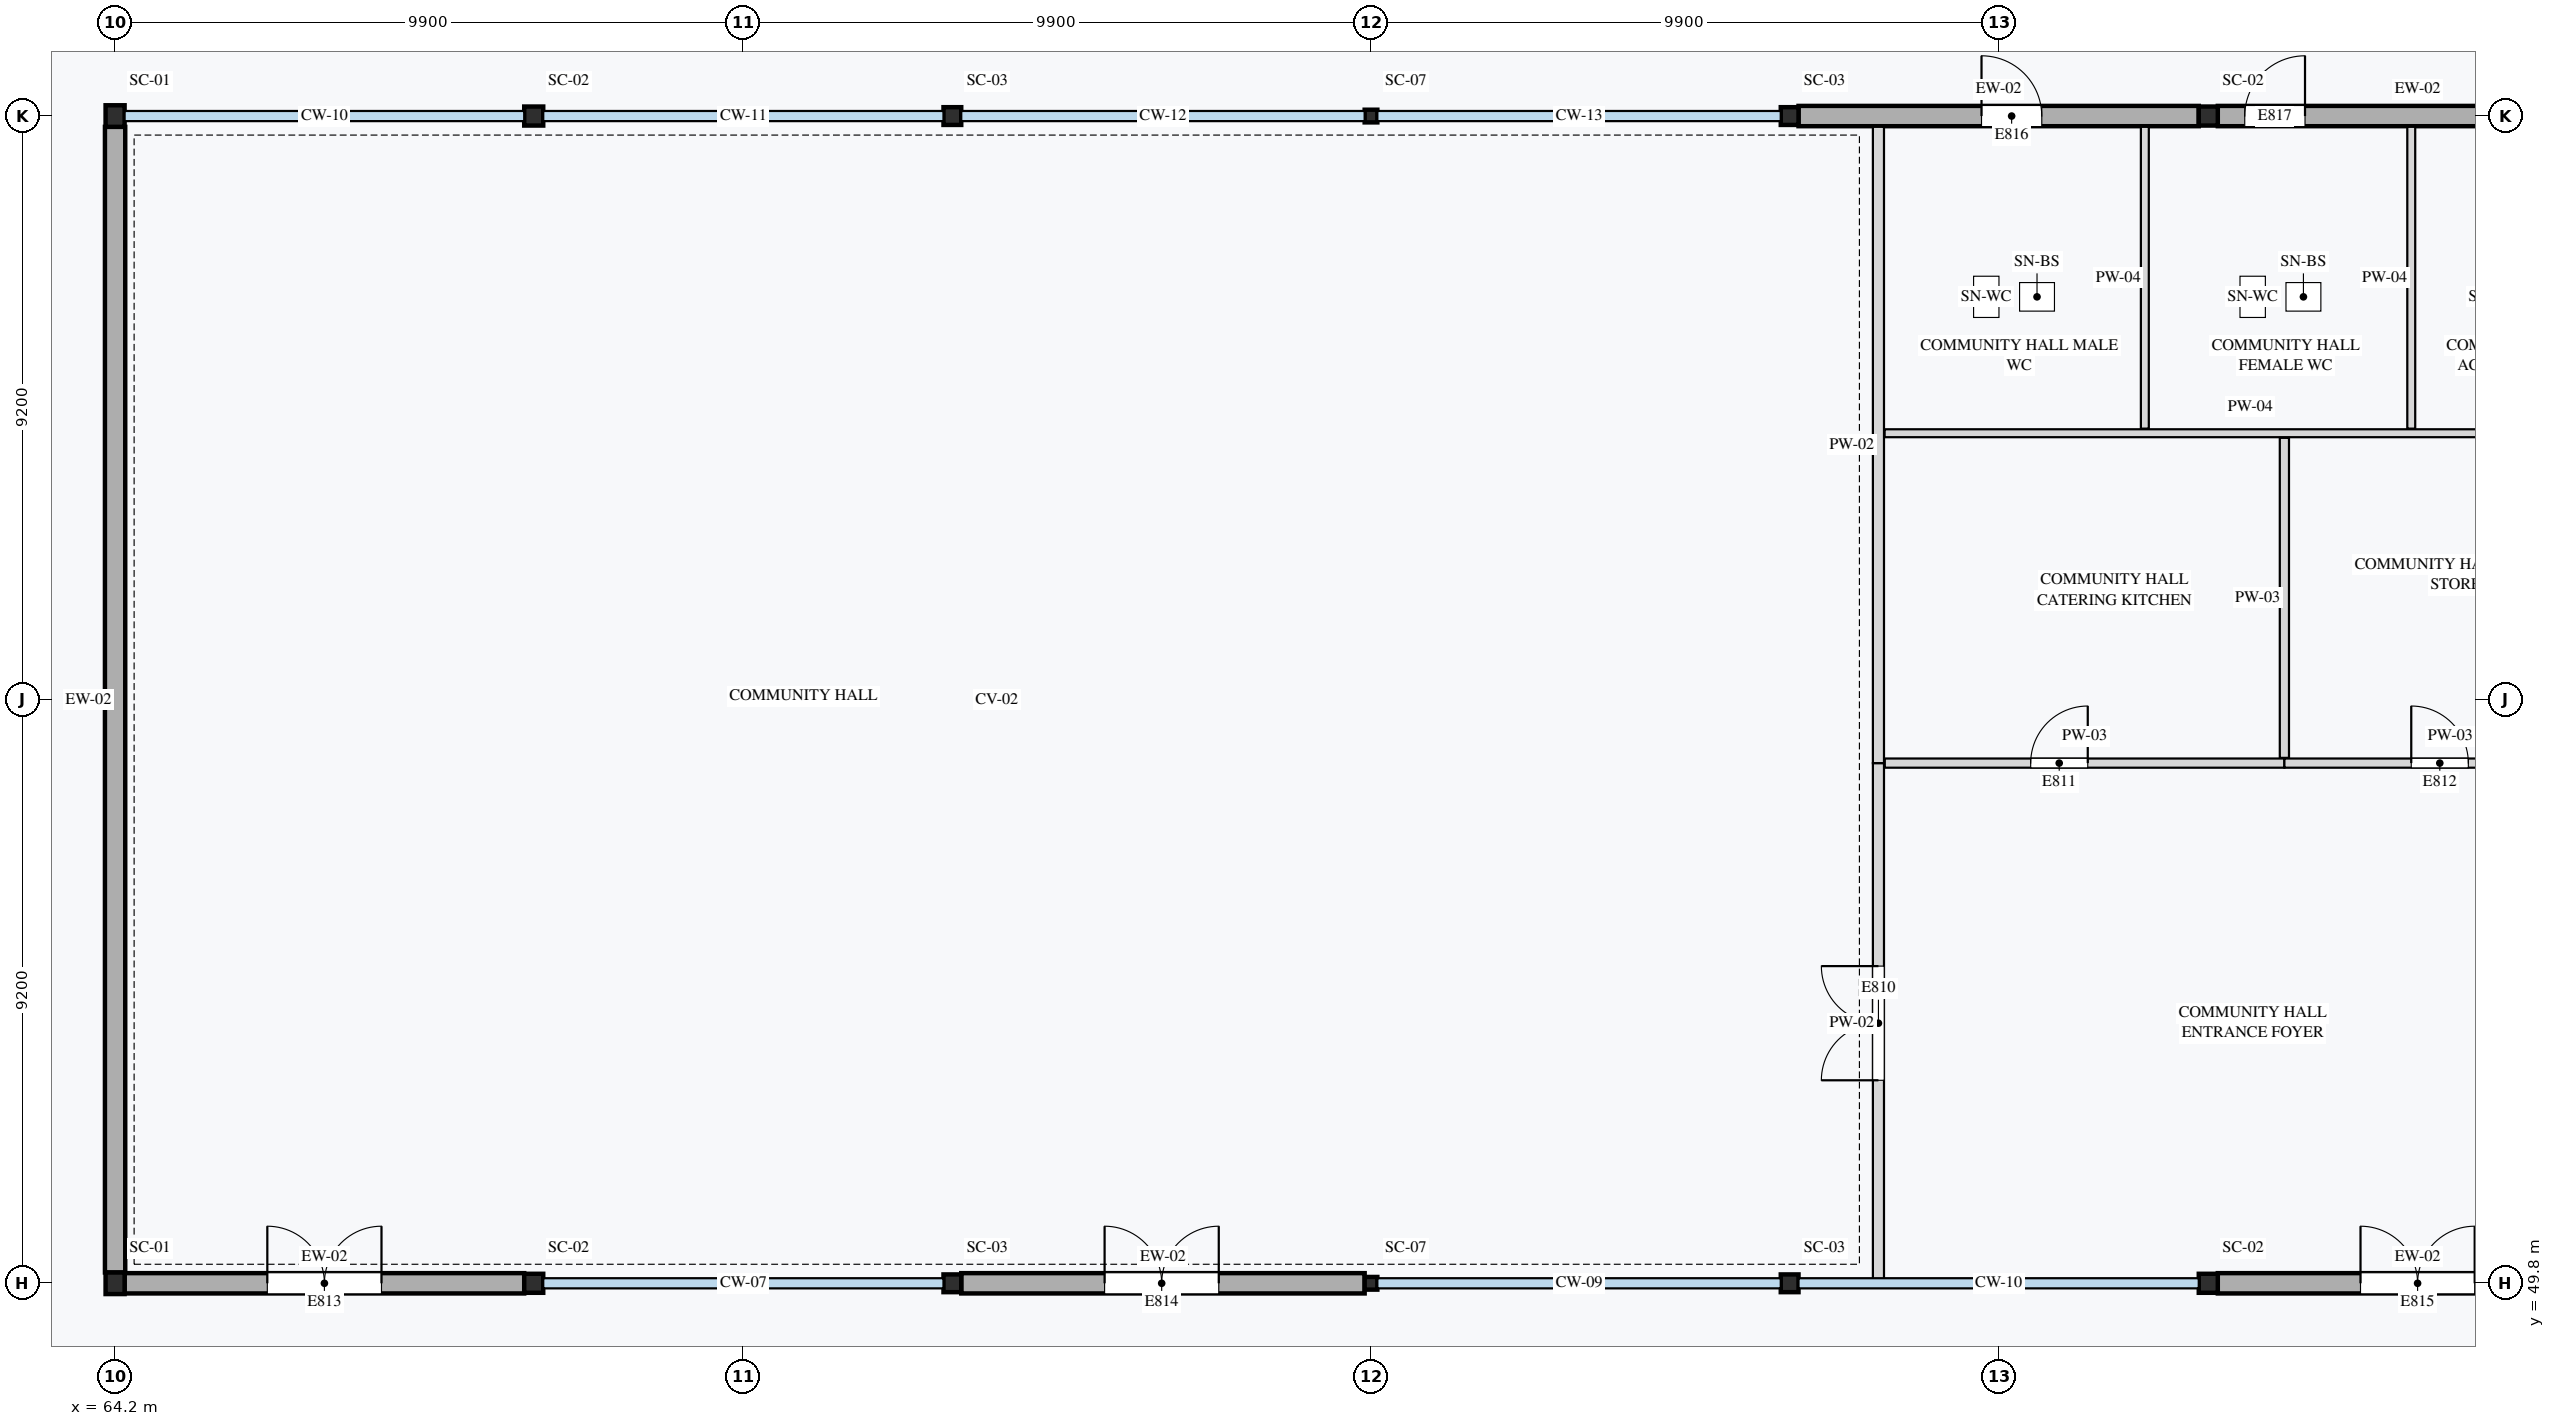
"""IFC4 building model, lengths in metres.
Left out: names, types, materials, properties, quantities, classifications, styles, units other than length and angle.
Written with IfcOpenShell. Run it as: python <this file> out.ifc"""

import sys

from ifc_helpers import new_model, si_unit, direction, frame, frame_2d, origin, origin_2d, place, context, subcontext, project, spatial, rectangle, hollow_rectangle, i_section, extrude, element, fill, save


model = new_model("IFC4")
c1 = context("Model", 3, precision=1e-05, world=origin(), true_north=direction((0.0, 1.0)))
c2 = subcontext(c1, "Body", "Model", "MODEL_VIEW")
j1 = project(units=[si_unit("LENGTHUNIT", "METRE"), si_unit("PLANEANGLEUNIT", "RADIAN")], contexts=[c1])
p1 = place(None, origin())
s1 = spatial("IfcSite", under=j1, at=p1, CompositionType="ELEMENT")
p2 = place(p1, origin())
s2 = spatial("IfcBuilding", under=s1, at=p2, CompositionType="ELEMENT")
p3 = place(p2, frame((0.0, 0.0, 4.2)))
s3 = spatial("IfcBuildingStorey", under=s2, at=p3, CompositionType="ELEMENT", Elevation=4.2)
for number, where, z_axis, x_axis in (
    (1, (64.2, 49.8, 0.0), (0.0, 0.0, 1.0), (1.0, 0.0, 0.0)),
    (2, (64.2, 68.2, 0.0), (0.0, 0.0, 1.0), (1.0, 0.0, 0.0)),
):
    element("IfcColumn", number, at=place(p3, frame(where, z_axis=z_axis, x_axis=x_axis)), inside=s3, PredefinedType="COLUMN", context=c2, shape_type="SweptSolid", body=[
        extrude(i_section(OverallWidth=0.3, OverallDepth=0.34, WebThickness=0.012, FlangeThickness=0.021, FilletRadius=0.027, at=origin_2d()), origin(), (0.0, 0.0, 1.0), 3.96),
    ])
for number, where, z_axis, x_axis in (
    (3, (70.8, 49.8, 0.0), (0.0, 0.0, 1.0), (1.0, 0.0, 0.0)),
    (4, (70.8, 68.2, 0.0), (0.0, 0.0, 1.0), (1.0, 0.0, 0.0)),
):
    element("IfcColumn", number, at=place(p3, frame(where, z_axis=z_axis, x_axis=x_axis)), inside=s3, PredefinedType="COLUMN", context=c2, shape_type="SweptSolid", body=[
        extrude(i_section(OverallWidth=0.3, OverallDepth=0.3, WebThickness=0.011, FlangeThickness=0.019, FilletRadius=0.027, at=origin_2d()), origin(), (0.0, 0.0, 1.0), 3.96),
    ])
for number, where, z_axis, x_axis in (
    (5, (77.4, 49.8, 0.0), (0.0, 0.0, 1.0), (1.0, 0.0, 0.0)),
    (6, (77.4, 68.2, 0.0), (0.0, 0.0, 1.0), (1.0, 0.0, 0.0)),
):
    element("IfcColumn", number, at=place(p3, frame(where, z_axis=z_axis, x_axis=x_axis)), inside=s3, PredefinedType="COLUMN", context=c2, shape_type="SweptSolid", body=[
        extrude(i_section(OverallWidth=0.28, OverallDepth=0.28, WebThickness=0.01, FlangeThickness=0.018, FilletRadius=0.024, at=origin_2d()), origin(), (0.0, 0.0, 1.0), 3.96),
    ])
for number, where, z_axis, x_axis in (
    (7, (84.0, 49.8, 0.0), (0.0, 0.0, 1.0), (1.0, 0.0, 0.0)),
    (8, (84.0, 68.2, 0.0), (0.0, 0.0, 1.0), (1.0, 0.0, 0.0)),
):
    element("IfcColumn", number, at=place(p3, frame(where, z_axis=z_axis, x_axis=x_axis)), inside=s3, PredefinedType="COLUMN", context=c2, shape_type="SweptSolid", body=[
        extrude(hollow_rectangle(XDim=0.2, YDim=0.2, WallThickness=0.01, InnerFilletRadius=0.01, OuterFilletRadius=0.015, at=origin_2d()), origin(), (0.0, 0.0, 1.0), 3.96),
    ])
for number, where, z_axis, x_axis in (
    (9, (90.6, 49.8, 0.0), (0.0, 0.0, 1.0), (1.0, 0.0, 0.0)),
    (10, (90.6, 68.2, 0.0), (0.0, 0.0, 1.0), (1.0, 0.0, 0.0)),
):
    element("IfcColumn", number, at=place(p3, frame(where, z_axis=z_axis, x_axis=x_axis)), inside=s3, PredefinedType="COLUMN", context=c2, shape_type="SweptSolid", body=[
        extrude(i_section(OverallWidth=0.28, OverallDepth=0.28, WebThickness=0.01, FlangeThickness=0.018, FilletRadius=0.024, at=origin_2d()), origin(), (0.0, 0.0, 1.0), 3.96),
    ])
for number, where, z_axis, x_axis in (
    (11, (97.2, 49.8, 0.0), (0.0, 0.0, 1.0), (1.0, 0.0, 0.0)),
    (12, (97.2, 68.2, 0.0), (0.0, 0.0, 1.0), (1.0, 0.0, 0.0)),
):
    element("IfcColumn", number, at=place(p3, frame(where, z_axis=z_axis, x_axis=x_axis)), inside=s3, PredefinedType="COLUMN", context=c2, shape_type="SweptSolid", body=[
        extrude(i_section(OverallWidth=0.3, OverallDepth=0.3, WebThickness=0.011, FlangeThickness=0.019, FilletRadius=0.027, at=origin_2d()), origin(), (0.0, 0.0, 1.0), 3.96),
    ])
p4 = place(p3, frame((64.35, 49.8, 0.0), z_axis=(0.0, 0.0, 1.0), x_axis=(1.0, 0.0, 0.0)))
e13 = element("IfcWall", 13, at=p4, inside=s3, PredefinedType="STANDARD", context=c2, shape_type="SweptSolid", body=[
    extrude(rectangle(XDim=6.3, YDim=0.32, at=frame_2d((3.15, 0.0))), origin(), (0.0, 0.0, 1.0), 3.55),
])
p5 = place(p4, frame((2.25, 0.0, 0.0)))
e14 = element("IfcOpeningElement", 14, at=p5, cuts=e13, PredefinedType="OPENING", context=c2, shape_type="SweptSolid", body=[
    extrude(rectangle(XDim=1.8, YDim=2.4, at=frame_2d((0.9, 1.2))), frame((0.0, 0.17, 0.0), z_axis=(0.0, -1.0, 0.0), x_axis=(1.0, 0.0, 0.0)), (0.0, 0.0, 1.0), 0.34),
])
p6 = place(p3, frame((77.54, 49.8, 0.0), z_axis=(0.0, 0.0, 1.0), x_axis=(1.0, 0.0, 0.0)))
e15 = element("IfcWall", 15, at=p6, inside=s3, PredefinedType="STANDARD", context=c2, shape_type="SweptSolid", body=[
    extrude(rectangle(XDim=6.36, YDim=0.32, at=frame_2d((3.18, 0.0))), origin(), (0.0, 0.0, 1.0), 3.55),
])
p7 = place(p6, frame((2.26, 0.0, 0.0)))
e16 = element("IfcOpeningElement", 16, at=p7, cuts=e15, PredefinedType="OPENING", context=c2, shape_type="SweptSolid", body=[
    extrude(rectangle(XDim=1.8, YDim=2.4, at=frame_2d((0.9, 1.2))), frame((0.0, 0.17, 0.0), z_axis=(0.0, -1.0, 0.0), x_axis=(1.0, 0.0, 0.0)), (0.0, 0.0, 1.0), 0.34),
])
p8 = place(p3, frame((90.74, 68.2, 0.0), z_axis=(0.0, 0.0, 1.0), x_axis=(1.0, 0.0, 0.0)))
e17 = element("IfcWall", 17, at=p8, inside=s3, PredefinedType="STANDARD", context=c2, shape_type="SweptSolid", body=[
    extrude(rectangle(XDim=6.31, YDim=0.32, at=frame_2d((3.155, 0.0))), origin(), (0.0, 0.0, 1.0), 3.55),
])
p9 = place(p8, frame((2.885, 0.0, 0.0)))
e18 = element("IfcOpeningElement", 18, at=p9, cuts=e17, PredefinedType="OPENING", context=c2, shape_type="SweptSolid", body=[
    extrude(rectangle(XDim=0.95, YDim=2.3, at=frame_2d((0.475, 1.15))), frame((0.0, 0.17, 0.0), z_axis=(0.0, -1.0, 0.0), x_axis=(1.0, 0.0, 0.0)), (0.0, 0.0, 1.0), 0.34),
])
p10 = place(p3, frame((97.35, 49.8, 0.0), z_axis=(0.0, 0.0, 1.0), x_axis=(1.0, 0.0, 0.0)))
e19 = element("IfcWall", 19, at=p10, inside=s3, PredefinedType="STANDARD", context=c2, shape_type="SweptSolid", body=[
    extrude(rectangle(XDim=6.3, YDim=0.32, at=frame_2d((3.15, 0.0))), origin(), (0.0, 0.0, 1.0), 3.55),
])
p11 = place(p10, frame((2.25, 0.0, 0.0)))
e20 = element("IfcOpeningElement", 20, at=p11, cuts=e19, PredefinedType="OPENING", context=c2, shape_type="SweptSolid", body=[
    extrude(rectangle(XDim=1.8, YDim=2.4, at=frame_2d((0.9, 1.2))), frame((0.0, 0.17, 0.0), z_axis=(0.0, -1.0, 0.0), x_axis=(1.0, 0.0, 0.0)), (0.0, 0.0, 1.0), 0.34),
])
p12 = place(p3, frame((97.35, 68.2, 0.0), z_axis=(0.0, 0.0, 1.0), x_axis=(1.0, 0.0, 0.0)))
e21 = element("IfcWall", 21, at=p12, inside=s3, PredefinedType="STANDARD", context=c2, shape_type="SweptSolid", body=[
    extrude(rectangle(XDim=6.3, YDim=0.32, at=frame_2d((3.15, 0.0))), origin(), (0.0, 0.0, 1.0), 3.55),
])
p13 = place(p12, frame((0.425, 0.0, 0.0)))
e22 = element("IfcOpeningElement", 22, at=p13, cuts=e21, PredefinedType="OPENING", context=c2, shape_type="SweptSolid", body=[
    extrude(rectangle(XDim=0.95, YDim=2.3, at=frame_2d((0.475, 1.15))), frame((0.0, 0.17, 0.0), z_axis=(0.0, -1.0, 0.0), x_axis=(1.0, 0.0, 0.0)), (0.0, 0.0, 1.0), 0.34),
])
p14 = place(p12, frame((4.225, 0.0, 0.0)))
e23 = element("IfcOpeningElement", 23, at=p14, cuts=e21, PredefinedType="OPENING", context=c2, shape_type="SweptSolid", body=[
    extrude(rectangle(XDim=0.95, YDim=2.3, at=frame_2d((0.475, 1.15))), frame((0.0, 0.17, 0.0), z_axis=(0.0, -1.0, 0.0), x_axis=(1.0, 0.0, 0.0)), (0.0, 0.0, 1.0), 0.34),
])
p15 = place(p3, frame((64.2, 49.97, 0.0), z_axis=(0.0, 0.0, 1.0), x_axis=(0.0, 1.0, 0.0)))
e24 = element("IfcWall", 24, at=p15, inside=s3, PredefinedType="STANDARD", context=c2, shape_type="SweptSolid", body=[
    extrude(rectangle(XDim=18.06, YDim=0.32, at=frame_2d((9.03, 0.0))), origin(), (0.0, 0.0, 1.0), 2.6),
])
p16 = place(p3, frame((92.0, 49.8, 0.0), z_axis=(0.0, 0.0, 1.0), x_axis=(0.0, 1.0, 0.0)))
e25 = element("IfcWall", 25, at=p16, inside=s3, PredefinedType="PARTITIONING", context=c2, shape_type="SweptSolid", body=[
    extrude(rectangle(XDim=8.2, YDim=0.175, at=frame_2d((4.1, 0.0))), origin(), (0.0, 0.0, 1.0), 2.6),
])
p17 = place(p16, frame((3.2, 0.0, 0.0)))
e26 = element("IfcOpeningElement", 26, at=p17, cuts=e25, PredefinedType="OPENING", context=c2, shape_type="SweptSolid", body=[
    extrude(rectangle(XDim=1.8, YDim=2.26, at=frame_2d((0.9, 1.13))), frame((0.0, 0.097, 0.0), z_axis=(0.0, -1.0, 0.0), x_axis=(1.0, 0.0, 0.0)), (0.0, 0.0, 1.0), 0.195),
])
p18 = place(p3, frame((92.0, 58.0, 0.0), z_axis=(0.0, 0.0, 1.0), x_axis=(0.0, 1.0, 0.0)))
e27 = element("IfcWall", 27, at=p18, inside=s3, PredefinedType="PARTITIONING", context=c2, shape_type="SweptSolid", body=[
    extrude(rectangle(XDim=10.03, YDim=0.175, at=frame_2d((5.015, 0.0))), origin(), (0.0, 0.0, 1.0), 2.6),
])
p19 = place(p3, frame((92.1, 58.0, 0.0), z_axis=(0.0, 0.0, 1.0), x_axis=(1.0, 0.0, 0.0)))
e28 = element("IfcWall", 28, at=p19, inside=s3, PredefinedType="PARTITIONING", context=c2, shape_type="SweptSolid", body=[
    extrude(rectangle(XDim=6.3, YDim=0.145, at=frame_2d((3.15, 0.0))), origin(), (0.0, 0.0, 1.0), 2.6),
])
p20 = place(p19, frame((2.3, 0.0, 0.0)))
e29 = element("IfcOpeningElement", 29, at=p20, cuts=e28, PredefinedType="OPENING", context=c2, shape_type="SweptSolid", body=[
    extrude(rectangle(XDim=0.9, YDim=2.1, at=frame_2d((0.45, 1.05))), frame((0.0, 0.083, 0.0), z_axis=(0.0, -1.0, 0.0), x_axis=(1.0, 0.0, 0.0)), (0.0, 0.0, 1.0), 0.165),
])
p21 = place(p3, frame((98.4, 58.0, 0.0), z_axis=(0.0, 0.0, 1.0), x_axis=(1.0, 0.0, 0.0)))
e30 = element("IfcWall", 30, at=p21, inside=s3, PredefinedType="PARTITIONING", context=c2, shape_type="SweptSolid", body=[
    extrude(rectangle(XDim=5.23, YDim=0.145, at=frame_2d((2.615, 0.0))), origin(), (0.0, 0.0, 1.0), 2.6),
])
p22 = place(p21, frame((2.0, 0.0, 0.0)))
e31 = element("IfcOpeningElement", 31, at=p22, cuts=e30, PredefinedType="OPENING", context=c2, shape_type="SweptSolid", body=[
    extrude(rectangle(XDim=0.9, YDim=2.16, at=frame_2d((0.45, 1.08))), frame((0.0, 0.083, 0.0), z_axis=(0.0, -1.0, 0.0), x_axis=(1.0, 0.0, 0.0)), (0.0, 0.0, 1.0), 0.165),
])
p23 = place(p3, frame((92.097, 63.2, 0.0), z_axis=(0.0, 0.0, 1.0), x_axis=(1.0, 0.0, 0.0)))
e32 = element("IfcWall", 32, at=p23, inside=s3, PredefinedType="PARTITIONING", context=c2, shape_type="SweptSolid", body=[
    extrude(rectangle(XDim=11.532, YDim=0.125, at=frame_2d((5.766, 0.0))), origin(), (0.0, 0.0, 1.0), 2.6),
])
p24 = place(p3, frame((98.4, 58.083, 0.0), z_axis=(0.0, 0.0, 1.0), x_axis=(0.0, 1.0, 0.0)))
e33 = element("IfcWall", 33, at=p24, inside=s3, PredefinedType="PARTITIONING", context=c2, shape_type="SweptSolid", body=[
    extrude(rectangle(XDim=5.045, YDim=0.145, at=frame_2d((2.522, 0.0))), origin(), (0.0, 0.0, 1.0), 2.6),
])
for number, where, z_axis, x_axis in (
    (34, (96.2, 63.272, 0.0), (0.0, 0.0, 1.0), (0.0, 1.0, 0.0)),
    (35, (100.4, 63.272, 0.0), (0.0, 0.0, 1.0), (0.0, 1.0, 0.0)),
):
    element("IfcWall", number, at=place(p3, frame(where, z_axis=z_axis, x_axis=x_axis)), inside=s3, PredefinedType="PARTITIONING", context=c2, shape_type="SweptSolid", body=[
        extrude(rectangle(XDim=4.758, YDim=0.125, at=frame_2d((2.379, 0.0))), origin(), (0.0, 0.0, 1.0), 2.6),
    ])
p25 = place(p5, origin())
e36 = element("IfcDoor", 36, at=p25, inside=s3, OperationType="DOUBLE_DOOR_SINGLE_SWING", PredefinedType="DOOR", context=c2, shape_type="SweptSolid", body=[
    extrude(rectangle(XDim=1.8, YDim=2.4, at=frame_2d((0.9, 1.2))), frame((0.0, 0.025, 0.0), z_axis=(0.0, -1.0, 0.0), x_axis=(1.0, 0.0, 0.0)), (0.0, 0.0, 1.0), 0.05),
])
fill(e14, e36)
p26 = place(p7, origin())
e37 = element("IfcDoor", 37, at=p26, inside=s3, OperationType="DOUBLE_DOOR_SINGLE_SWING", PredefinedType="DOOR", context=c2, shape_type="SweptSolid", body=[
    extrude(rectangle(XDim=1.8, YDim=2.4, at=frame_2d((0.9, 1.2))), frame((0.0, 0.025, 0.0), z_axis=(0.0, -1.0, 0.0), x_axis=(1.0, 0.0, 0.0)), (0.0, 0.0, 1.0), 0.05),
])
fill(e16, e37)
p27 = place(p11, origin())
e38 = element("IfcDoor", 38, at=p27, inside=s3, OperationType="DOUBLE_DOOR_SINGLE_SWING", PredefinedType="DOOR", context=c2, shape_type="SweptSolid", body=[
    extrude(rectangle(XDim=1.8, YDim=2.4, at=frame_2d((0.9, 1.2))), frame((0.0, 0.025, 0.0), z_axis=(0.0, -1.0, 0.0), x_axis=(1.0, 0.0, 0.0)), (0.0, 0.0, 1.0), 0.05),
])
fill(e20, e38)
p28 = place(p9, origin())
e39 = element("IfcDoor", 39, at=p28, inside=s3, OperationType="SINGLE_SWING_LEFT", PredefinedType="DOOR", context=c2, shape_type="SweptSolid", body=[
    extrude(rectangle(XDim=0.95, YDim=2.3, at=frame_2d((0.475, 1.15))), frame((0.0, 0.025, 0.0), z_axis=(0.0, -1.0, 0.0), x_axis=(1.0, 0.0, 0.0)), (0.0, 0.0, 1.0), 0.05),
])
fill(e18, e39)
p29 = place(p13, origin())
e40 = element("IfcDoor", 40, at=p29, inside=s3, OperationType="SINGLE_SWING_RIGHT", PredefinedType="DOOR", context=c2, shape_type="SweptSolid", body=[
    extrude(rectangle(XDim=0.95, YDim=2.3, at=frame_2d((0.475, 1.15))), frame((0.0, 0.025, 0.0), z_axis=(0.0, -1.0, 0.0), x_axis=(1.0, 0.0, 0.0)), (0.0, 0.0, 1.0), 0.05),
])
fill(e22, e40)
p30 = place(p17, origin())
e41 = element("IfcDoor", 41, at=p30, inside=s3, OperationType="DOUBLE_DOOR_SINGLE_SWING", PredefinedType="DOOR", context=c2, shape_type="SweptSolid", body=[
    extrude(rectangle(XDim=1.8, YDim=2.26, at=frame_2d((0.9, 1.13))), frame((0.0, 0.025, 0.0), z_axis=(0.0, -1.0, 0.0), x_axis=(1.0, 0.0, 0.0)), (0.0, 0.0, 1.0), 0.05),
])
fill(e26, e41)
p31 = place(p20, origin())
e42 = element("IfcDoor", 42, at=p31, inside=s3, OperationType="SINGLE_SWING_RIGHT", PredefinedType="DOOR", context=c2, shape_type="SweptSolid", body=[
    extrude(rectangle(XDim=0.9, YDim=2.1, at=frame_2d((0.45, 1.05))), frame((0.0, 0.025, 0.0), z_axis=(0.0, -1.0, 0.0), x_axis=(1.0, 0.0, 0.0)), (0.0, 0.0, 1.0), 0.05),
])
fill(e29, e42)
p32 = place(p22, origin())
e43 = element("IfcDoor", 43, at=p32, inside=s3, OperationType="SINGLE_SWING_LEFT", PredefinedType="DOOR", context=c2, shape_type="SweptSolid", body=[
    extrude(rectangle(XDim=0.9, YDim=2.16, at=frame_2d((0.45, 1.08))), frame((0.0, 0.025, 0.0), z_axis=(0.0, -1.0, 0.0), x_axis=(1.0, 0.0, 0.0)), (0.0, 0.0, 1.0), 0.05),
])
fill(e31, e43)
save(model, sys.argv[1])
